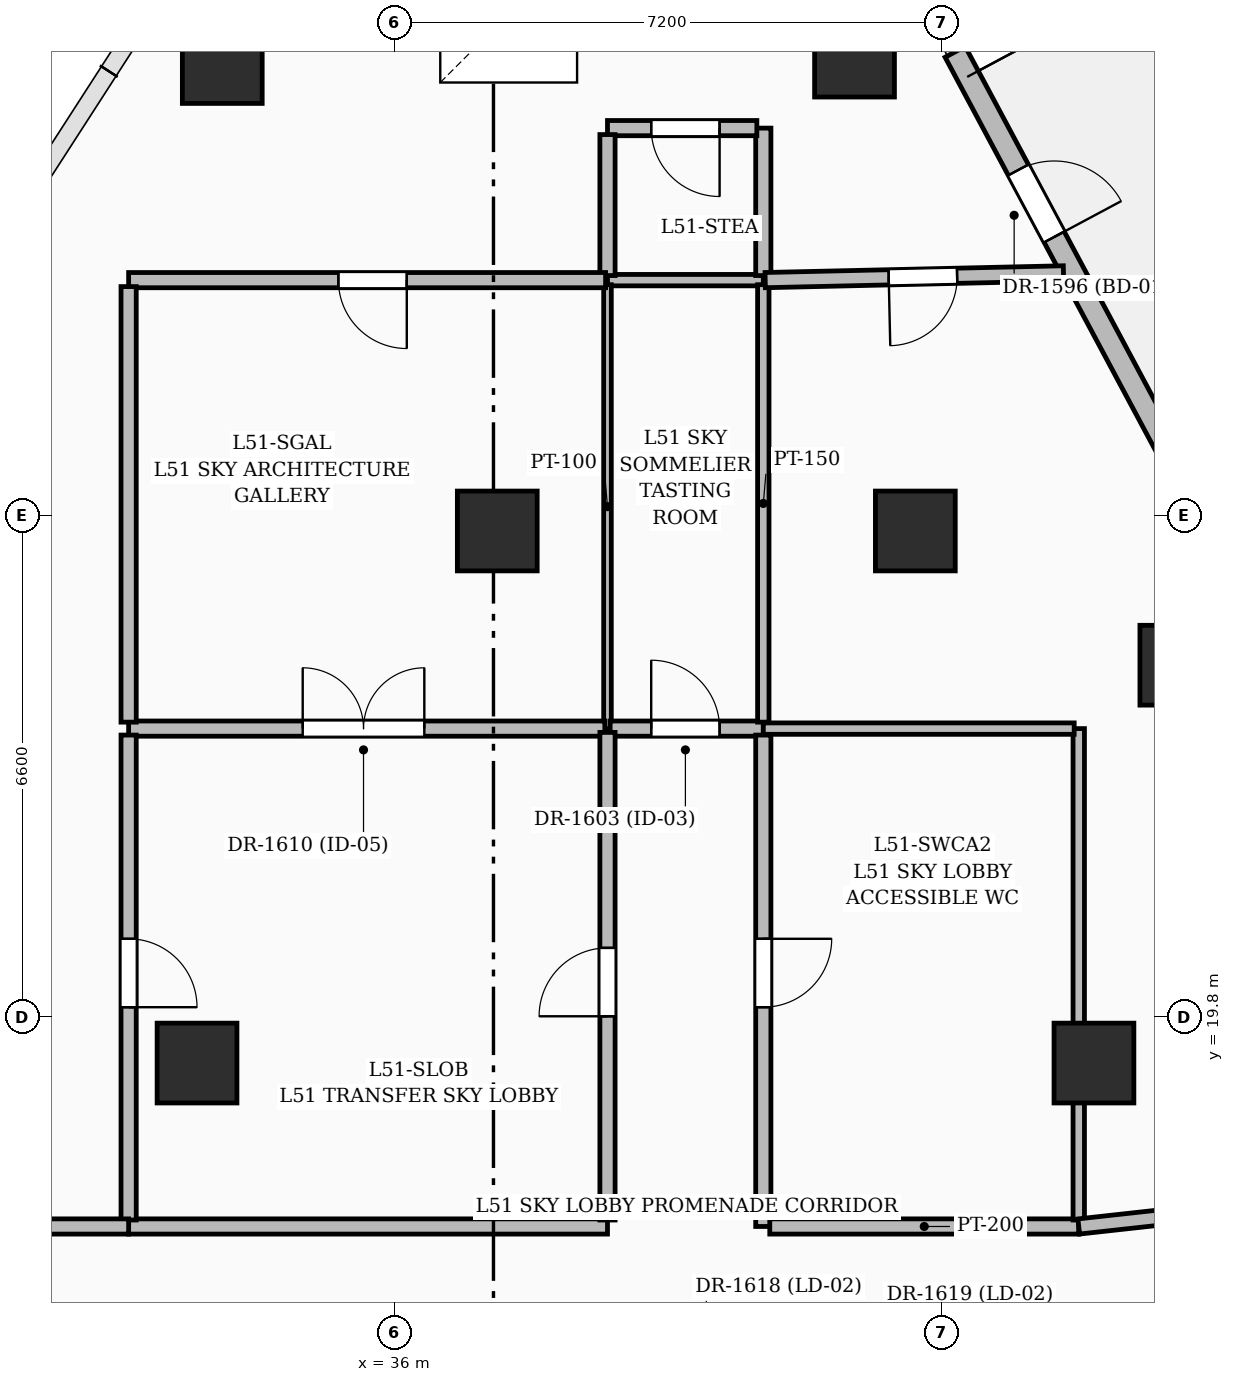
"""IFC4 building model, lengths in metres.
Left out: names, types, materials, properties, quantities, classifications, styles, units other than length and angle.
Written with IfcOpenShell. Run it as: python <this file> out.ifc"""

import sys

from ifc_helpers import new_model, si_unit, direction, frame, frame_2d, origin, origin_2d, place, context, subcontext, project, spatial, rectangle, extrude, element, fill, save


model = new_model("IFC4")
c1 = context("Model", 3, precision=1e-05, world=origin(), true_north=direction((0.0, 1.0)))
c2 = subcontext(c1, "Body", "Model", "MODEL_VIEW")
j1 = project(units=[si_unit("LENGTHUNIT", "METRE"), si_unit("PLANEANGLEUNIT", "RADIAN")], contexts=[c1])
p1 = place(None, origin())
s1 = spatial("IfcSite", under=j1, at=p1, CompositionType="ELEMENT")
p2 = place(p1, origin())
s2 = spatial("IfcBuilding", under=s1, at=p2, CompositionType="ELEMENT")
p3 = place(p2, frame((0.0, 0.0, 196.8)))
s3 = spatial("IfcBuildingStorey", under=s2, at=p3, CompositionType="ELEMENT", Elevation=196.8)
for number, where, z_axis, x_axis in (
    (1, (45.2, 19.2, 0.0), (0.0, 0.0, 1.0), (1.0, 0.0, 0.0)),
    (2, (42.85, 26.2, 0.0), (0.0, 0.0, 1.0), (1.0, 0.0, 0.0)),
    (3, (37.35, 26.2, 0.0), (0.0, 0.0, 1.0), (1.0, 0.0, 0.0)),
    (4, (33.4, 19.2, 0.0), (0.0, 0.0, 1.0), (1.0, 0.0, 0.0)),
    (5, (46.33, 24.434, 0.0), (0.0, 0.0, 1.0), (1.0, 0.0, 0.0)),
    (6, (42.05, 32.434, 0.0), (0.0, 0.0, 1.0), (1.0, 0.0, 0.0)),
    (7, (33.732, 32.35, 0.0), (0.0, 0.0, 1.0), (1.0, 0.0, 0.0)),
):
    element("IfcColumn", number, at=place(p3, frame(where, z_axis=z_axis, x_axis=x_axis)), inside=s3, PredefinedType="COLUMN", context=c2, shape_type="SweptSolid", body=[
        extrude(rectangle(XDim=1.05, YDim=1.05, at=origin_2d()), origin(), (0.0, 0.0, 1.0), 4.8),
    ])
p4 = place(p3, frame((43.374, 32.503, 0.0), z_axis=(0.0, 0.0, 1.0), x_axis=(0.471750001728, -0.881732349338, 0.0)))
e8 = element("IfcWall", 8, at=p4, inside=s3, PredefinedType="SOLIDWALL", context=c2, shape_type="SweptSolid", body=[
    extrude(rectangle(XDim=6.684, YDim=0.3, at=frame_2d((3.342, 0.0))), origin(), (0.0, 0.0, 1.0), 4.5),
])
p5 = place(p4, frame((1.762, 0.0, 0.0)))
e9 = element("IfcOpeningElement", 9, at=p5, cuts=e8, PredefinedType="OPENING", context=c2, shape_type="SweptSolid", body=[
    extrude(rectangle(XDim=1.0, YDim=2.2, at=frame_2d((0.5, 1.1))), frame((0.0, 0.16, 0.0), z_axis=(0.0, -1.0, 0.0), x_axis=(1.0, 0.0, 0.0)), (0.0, 0.0, 1.0), 0.32),
])
p6 = place(p3, frame((38.8, 29.5, 0.0), z_axis=(0.0, 0.0, 1.0), x_axis=(1.0, 0.0, 0.0)))
e10 = element("IfcWall", 10, at=p6, inside=s3, PredefinedType="PARTITIONING", context=c2, shape_type="SweptSolid", body=[
    extrude(rectangle(XDim=2.05, YDim=0.15, at=frame_2d((1.025, 0.0))), origin(), (0.0, 0.0, 1.0), 4.5),
])
p7 = place(p3, frame((40.85, 29.56, 0.0), z_axis=(0.0, 0.0, 1.0), x_axis=(0.0, 1.0, 0.0)))
e11 = element("IfcWall", 11, at=p7, inside=s3, PredefinedType="PARTITIONING", context=c2, shape_type="SweptSolid", body=[
    extrude(rectangle(XDim=1.94, YDim=0.2, at=frame_2d((0.97, 0.0))), origin(), (0.0, 0.0, 1.0), 3.937),
])
p8 = place(p3, frame((40.765, 31.5, 0.0), z_axis=(0.0, 0.0, 1.0), x_axis=(-1.0, 0.0, 0.0)))
e12 = element("IfcWall", 12, at=p8, inside=s3, PredefinedType="PARTITIONING", context=c2, shape_type="SweptSolid", body=[
    extrude(rectangle(XDim=1.965, YDim=0.2, at=frame_2d((0.982, 0.0))), origin(), (0.0, 0.0, 1.0), 4.5),
])
p9 = place(p8, frame((0.49, 0.0, 0.0)))
e13 = element("IfcOpeningElement", 13, at=p9, cuts=e12, PredefinedType="OPENING", context=c2, shape_type="SweptSolid", body=[
    extrude(rectangle(XDim=0.9, YDim=2.1, at=frame_2d((0.45, 1.05))), frame((0.0, 0.11, 0.0), z_axis=(0.0, -1.0, 0.0), x_axis=(1.0, 0.0, 0.0)), (0.0, 0.0, 1.0), 0.22),
])
p10 = place(p3, frame((38.8, 31.415, 0.0), z_axis=(0.0, 0.0, 1.0), x_axis=(0.0, -1.0, 0.0)))
e14 = element("IfcWall", 14, at=p10, inside=s3, PredefinedType="PARTITIONING", context=c2, shape_type="SweptSolid", body=[
    extrude(rectangle(XDim=1.855, YDim=0.2, at=frame_2d((0.927, 0.0))), origin(), (0.0, 0.0, 1.0), 3.937),
])
p11 = place(p3, frame((38.8, 29.44, 0.0), z_axis=(0.0, 0.0, 1.0), x_axis=(0.0, -1.0, 0.0)))
e15 = element("IfcWall", 15, at=p11, inside=s3, PredefinedType="PARTITIONING", context=c2, shape_type="SweptSolid", body=[
    extrude(rectangle(XDim=5.84, YDim=0.1, at=frame_2d((2.92, 0.0))), origin(), (0.0, 0.0, 1.0), 3.586),
])
p12 = place(p3, frame((38.835, 23.6, 0.0), z_axis=(0.0, 0.0, 1.0), x_axis=(1.0, 0.0, 0.0)))
e16 = element("IfcWall", 16, at=p12, inside=s3, PredefinedType="PARTITIONING", context=c2, shape_type="SweptSolid", body=[
    extrude(rectangle(XDim=2.015, YDim=0.2, at=frame_2d((1.008, 0.0))), origin(), (0.0, 0.0, 1.0), 4.5),
])
p13 = place(p12, frame((0.54, 0.0, 0.0)))
e17 = element("IfcOpeningElement", 17, at=p13, cuts=e16, PredefinedType="OPENING", context=c2, shape_type="SweptSolid", body=[
    extrude(rectangle(XDim=0.9, YDim=2.1, at=frame_2d((0.45, 1.05))), frame((0.0, 0.11, 0.0), z_axis=(0.0, -1.0, 0.0), x_axis=(1.0, 0.0, 0.0)), (0.0, 0.0, 1.0), 0.22),
])
p14 = place(p3, frame((40.85, 23.685, 0.0), z_axis=(0.0, 0.0, 1.0), x_axis=(0.0, 1.0, 0.0)))
e18 = element("IfcWall", 18, at=p14, inside=s3, PredefinedType="PARTITIONING", context=c2, shape_type="SweptSolid", body=[
    extrude(rectangle(XDim=5.755, YDim=0.15, at=frame_2d((2.877, 0.0))), origin(), (0.0, 0.0, 1.0), 3.586),
])
p15 = place(p3, frame((40.85, 23.515, 0.0), z_axis=(0.0, 0.0, 1.0), x_axis=(0.0, -1.0, 0.0)))
e19 = element("IfcWall", 19, at=p15, inside=s3, PredefinedType="PARTITIONING", context=c2, shape_type="SweptSolid", body=[
    extrude(rectangle(XDim=6.465, YDim=0.2, at=frame_2d((3.232, 0.0))), origin(), (0.0, 0.0, 1.0), 4.5),
])
p16 = place(p15, frame((2.68, 0.0, 0.0)))
e20 = element("IfcOpeningElement", 20, at=p16, cuts=e19, PredefinedType="OPENING", context=c2, shape_type="SweptSolid", body=[
    extrude(rectangle(XDim=0.9, YDim=2.1, at=frame_2d((0.45, 1.05))), frame((0.0, 0.11, 0.0), z_axis=(0.0, -1.0, 0.0), x_axis=(1.0, 0.0, 0.0)), (0.0, 0.0, 1.0), 0.22),
])
p17 = place(p3, frame((40.935, 17.05, 0.0), z_axis=(0.0, 0.0, 1.0), x_axis=(1.0, 0.0, 0.0)))
e21 = element("IfcWall", 21, at=p17, inside=s3, PredefinedType="PARTITIONING", context=c2, shape_type="SweptSolid", body=[
    extrude(rectangle(XDim=4.065, YDim=0.2, at=frame_2d((2.032, 0.0))), origin(), (0.0, 0.0, 1.0), 4.5),
])
p18 = place(p3, frame((45.0, 17.135, 0.0), z_axis=(0.0, 0.0, 1.0), x_axis=(0.0, 1.0, 0.0)))
e22 = element("IfcWall", 22, at=p18, inside=s3, PredefinedType="PARTITIONING", context=c2, shape_type="SweptSolid", body=[
    extrude(rectangle(XDim=6.465, YDim=0.15, at=frame_2d((3.232, 0.0))), origin(), (0.0, 0.0, 1.0), 2.27),
])
p19 = place(p3, frame((44.94, 23.6, 0.0), z_axis=(0.0, 0.0, 1.0), x_axis=(-1.0, 0.0, 0.0)))
e23 = element("IfcWall", 23, at=p19, inside=s3, PredefinedType="PARTITIONING", context=c2, shape_type="SweptSolid", body=[
    extrude(rectangle(XDim=4.09, YDim=0.15, at=frame_2d((2.045, 0.0))), origin(), (0.0, 0.0, 1.0), 3.586),
])
p20 = place(p3, frame((32.5, 23.6, 0.0), z_axis=(0.0, 0.0, 1.0), x_axis=(1.0, 0.0, 0.0)))
e24 = element("IfcWall", 24, at=p20, inside=s3, PredefinedType="PARTITIONING", context=c2, shape_type="SweptSolid", body=[
    extrude(rectangle(XDim=6.265, YDim=0.2, at=frame_2d((3.132, 0.0))), origin(), (0.0, 0.0, 1.0), 3.586),
])
p21 = place(p20, frame((2.29, 0.0, 0.0)))
e25 = element("IfcOpeningElement", 25, at=p21, cuts=e24, PredefinedType="OPENING", context=c2, shape_type="SweptSolid", body=[
    extrude(rectangle(XDim=1.6, YDim=2.3, at=frame_2d((0.8, 1.15))), frame((0.0, 0.11, 0.0), z_axis=(0.0, -1.0, 0.0), x_axis=(1.0, 0.0, 0.0)), (0.0, 0.0, 1.0), 0.22),
])
p22 = place(p3, frame((38.775, 29.5, 0.0), z_axis=(0.0, 0.0, 1.0), x_axis=(-1.0, 0.0, 0.0)))
e26 = element("IfcWall", 26, at=p22, inside=s3, PredefinedType="PARTITIONING", context=c2, shape_type="SweptSolid", body=[
    extrude(rectangle(XDim=6.275, YDim=0.2, at=frame_2d((3.137, 0.0))), origin(), (0.0, 0.0, 1.0), 2.27),
])
p23 = place(p22, frame((2.615, 0.0, 0.0)))
e27 = element("IfcOpeningElement", 27, at=p23, cuts=e26, PredefinedType="OPENING", context=c2, shape_type="SweptSolid", body=[
    extrude(rectangle(XDim=0.9, YDim=2.1, at=frame_2d((0.45, 1.05))), frame((0.0, 0.11, 0.0), z_axis=(0.0, -1.0, 0.0), x_axis=(1.0, 0.0, 0.0)), (0.0, 0.0, 1.0), 0.22),
])
p24 = place(p3, frame((32.5, 29.415, 0.0), z_axis=(0.0, 0.0, 1.0), x_axis=(0.0, -1.0, 0.0)))
e28 = element("IfcWall", 28, at=p24, inside=s3, PredefinedType="PARTITIONING", context=c2, shape_type="SweptSolid", body=[
    extrude(rectangle(XDim=5.73, YDim=0.2, at=frame_2d((2.865, 0.0))), origin(), (0.0, 0.0, 1.0), 3.937),
])
p25 = place(p3, frame((32.5, 17.05, 0.0), z_axis=(0.0, 0.0, 1.0), x_axis=(1.0, 0.0, 0.0)))
e29 = element("IfcWall", 29, at=p25, inside=s3, PredefinedType="PARTITIONING", context=c2, shape_type="SweptSolid", body=[
    extrude(rectangle(XDim=6.3, YDim=0.2, at=frame_2d((3.15, 0.0))), origin(), (0.0, 0.0, 1.0), 3.586),
])
p26 = place(p3, frame((38.8, 17.135, 0.0), z_axis=(0.0, 0.0, 1.0), x_axis=(0.0, 1.0, 0.0)))
e30 = element("IfcWall", 30, at=p26, inside=s3, PredefinedType="PARTITIONING", context=c2, shape_type="SweptSolid", body=[
    extrude(rectangle(XDim=6.415, YDim=0.2, at=frame_2d((3.208, 0.0))), origin(), (0.0, 0.0, 1.0), 4.5),
])
p27 = place(p26, frame((2.68, 0.0, 0.0)))
e31 = element("IfcOpeningElement", 31, at=p27, cuts=e30, PredefinedType="OPENING", context=c2, shape_type="SweptSolid", body=[
    extrude(rectangle(XDim=0.9, YDim=2.1, at=frame_2d((0.45, 1.05))), frame((0.0, 0.11, 0.0), z_axis=(0.0, -1.0, 0.0), x_axis=(1.0, 0.0, 0.0)), (0.0, 0.0, 1.0), 0.22),
])
p28 = place(p3, frame((32.5, 23.515, 0.0), z_axis=(0.0, 0.0, 1.0), x_axis=(0.0, -1.0, 0.0)))
e32 = element("IfcWall", 32, at=p28, inside=s3, PredefinedType="PARTITIONING", context=c2, shape_type="SweptSolid", body=[
    extrude(rectangle(XDim=6.38, YDim=0.2, at=frame_2d((3.19, 0.0))), origin(), (0.0, 0.0, 1.0), 2.27),
])
p29 = place(p28, frame((2.68, 0.0, 0.0)))
e33 = element("IfcOpeningElement", 33, at=p29, cuts=e32, PredefinedType="OPENING", context=c2, shape_type="SweptSolid", body=[
    extrude(rectangle(XDim=0.9, YDim=2.1, at=frame_2d((0.45, 1.05))), frame((0.0, 0.11, 0.0), z_axis=(0.0, -1.0, 0.0), x_axis=(1.0, 0.0, 0.0)), (0.0, 0.0, 1.0), 0.22),
])
p30 = place(p3, frame((48.947, 17.486, 0.0), z_axis=(0.0, 0.0, 1.0), x_axis=(-0.993953264298, -0.109803954354, 0.0)))
e34 = element("IfcWall", 34, at=p30, inside=s3, PredefinedType="PARTITIONING", context=c2, shape_type="SweptSolid", body=[
    extrude(rectangle(XDim=3.971, YDim=0.2, at=frame_2d((1.985, 0.0))), origin(), (0.0, 0.0, 1.0), 2.27),
])
p31 = place(p30, frame((1.524, 0.0, 0.0)))
e35 = element("IfcOpeningElement", 35, at=p31, cuts=e34, PredefinedType="OPENING", context=c2, shape_type="SweptSolid", body=[
    extrude(rectangle(XDim=0.9, YDim=2.1, at=frame_2d((0.45, 1.05))), frame((0.0, 0.11, 0.0), z_axis=(0.0, -1.0, 0.0), x_axis=(1.0, 0.0, 0.0)), (0.0, 0.0, 1.0), 0.22),
])
p32 = place(p3, frame((32.5, 17.05, 0.0), z_axis=(0.0, 0.0, 1.0), x_axis=(-1.0, 0.0, 0.0)))
e36 = element("IfcWall", 36, at=p32, inside=s3, PredefinedType="PARTITIONING", context=c2, shape_type="SweptSolid", body=[
    extrude(rectangle(XDim=5.7, YDim=0.2, at=frame_2d((2.85, 0.0))), origin(), (0.0, 0.0, 1.0), 3.937),
])
p33 = place(p32, frame((2.4, 0.0, 0.0)))
e37 = element("IfcOpeningElement", 37, at=p33, cuts=e36, PredefinedType="OPENING", context=c2, shape_type="SweptSolid", body=[
    extrude(rectangle(XDim=0.9, YDim=2.1, at=frame_2d((0.45, 1.05))), frame((0.0, 0.11, 0.0), z_axis=(0.0, -1.0, 0.0), x_axis=(1.0, 0.0, 0.0)), (0.0, 0.0, 1.0), 0.22),
])
p34 = place(p3, frame((44.799, 29.589, 0.0), z_axis=(0.0, 0.0, 1.0), x_axis=(-0.999745068637, -0.022578700922, 0.0)))
e38 = element("IfcWall", 38, at=p34, inside=s3, PredefinedType="PARTITIONING", context=c2, shape_type="SweptSolid", body=[
    extrude(rectangle(XDim=3.925, YDim=0.2, at=frame_2d((1.962, 0.0))), origin(), (0.0, 0.0, 1.0), 2.27),
])
p35 = place(p34, frame((1.4, 0.0, 0.0)))
e39 = element("IfcOpeningElement", 39, at=p35, cuts=e38, PredefinedType="OPENING", context=c2, shape_type="SweptSolid", body=[
    extrude(rectangle(XDim=0.9, YDim=2.1, at=frame_2d((0.45, 1.05))), frame((0.0, 0.11, 0.0), z_axis=(0.0, -1.0, 0.0), x_axis=(1.0, 0.0, 0.0)), (0.0, 0.0, 1.0), 0.22),
])
p36 = place(p5, origin())
e40 = element("IfcDoor", 40, at=p36, inside=s3, OperationType="SINGLE_SWING_RIGHT", PredefinedType="DOOR", context=c2, shape_type="SweptSolid", body=[
    extrude(rectangle(XDim=1.0, YDim=2.2, at=frame_2d((0.5, 1.1))), frame((0.0, 0.025, 0.0), z_axis=(0.0, -1.0, 0.0), x_axis=(1.0, 0.0, 0.0)), (0.0, 0.0, 1.0), 0.05),
])
fill(e9, e40)
p37 = place(p3, frame((0.0, 0.0, -0.3)))
p38 = place(p37, frame((37.5, 33.0, 0.0)))
p39 = place(p38, frame((0.0, 0.0, 0.25)))
e41 = element("IfcWindow", 41, at=p39, inside=s3, PartitioningType="SINGLE_PANEL", PredefinedType="SKYLIGHT", context=c2, shape_type="SweptSolid", body=[
    extrude(rectangle(XDim=1.8, YDim=1.8, at=origin_2d()), origin(), (0.0, 0.0, 1.0), 0.05),
])
p40 = place(p13, origin())
e42 = element("IfcDoor", 42, at=p40, inside=s3, OperationType="SINGLE_SWING_LEFT", PredefinedType="DOOR", context=c2, shape_type="SweptSolid", body=[
    extrude(rectangle(XDim=0.9, YDim=2.1, at=frame_2d((0.45, 1.05))), frame((0.0, 0.025, 0.0), z_axis=(0.0, -1.0, 0.0), x_axis=(1.0, 0.0, 0.0)), (0.0, 0.0, 1.0), 0.05),
])
fill(e17, e42)
p41 = place(p35, origin())
e43 = element("IfcDoor", 43, at=p41, inside=s3, OperationType="SINGLE_SWING_RIGHT", PredefinedType="DOOR", context=c2, shape_type="SweptSolid", body=[
    extrude(rectangle(XDim=0.9, YDim=2.1, at=frame_2d((0.45, 1.05))), frame((0.0, 0.025, 0.0), z_axis=(0.0, -1.0, 0.0), x_axis=(1.0, 0.0, 0.0)), (0.0, 0.0, 1.0), 0.05),
])
fill(e39, e43)
p42 = place(p27, origin())
e44 = element("IfcDoor", 44, at=p42, inside=s3, OperationType="SINGLE_SWING_LEFT", PredefinedType="DOOR", context=c2, shape_type="SweptSolid", body=[
    extrude(rectangle(XDim=0.9, YDim=2.1, at=frame_2d((0.45, 1.05))), frame((0.0, 0.025, 0.0), z_axis=(0.0, -1.0, 0.0), x_axis=(1.0, 0.0, 0.0)), (0.0, 0.0, 1.0), 0.05),
])
fill(e31, e44)
p43 = place(p16, origin())
e45 = element("IfcDoor", 45, at=p43, inside=s3, OperationType="SINGLE_SWING_LEFT", PredefinedType="DOOR", context=c2, shape_type="SweptSolid", body=[
    extrude(rectangle(XDim=0.9, YDim=2.1, at=frame_2d((0.45, 1.05))), frame((0.0, 0.025, 0.0), z_axis=(0.0, -1.0, 0.0), x_axis=(1.0, 0.0, 0.0)), (0.0, 0.0, 1.0), 0.05),
])
fill(e20, e45)
p44 = place(p21, origin())
e46 = element("IfcDoor", 46, at=p44, inside=s3, OperationType="DOUBLE_DOOR_SINGLE_SWING", PredefinedType="DOOR", context=c2, shape_type="SweptSolid", body=[
    extrude(rectangle(XDim=1.6, YDim=2.3, at=frame_2d((0.8, 1.15))), frame((0.0, 0.025, 0.0), z_axis=(0.0, -1.0, 0.0), x_axis=(1.0, 0.0, 0.0)), (0.0, 0.0, 1.0), 0.05),
])
fill(e25, e46)
p45 = place(p23, origin())
e47 = element("IfcDoor", 47, at=p45, inside=s3, OperationType="SINGLE_SWING_LEFT", PredefinedType="DOOR", context=c2, shape_type="SweptSolid", body=[
    extrude(rectangle(XDim=0.9, YDim=2.1, at=frame_2d((0.45, 1.05))), frame((0.0, 0.025, 0.0), z_axis=(0.0, -1.0, 0.0), x_axis=(1.0, 0.0, 0.0)), (0.0, 0.0, 1.0), 0.05),
])
fill(e27, e47)
p46 = place(p29, origin())
e48 = element("IfcDoor", 48, at=p46, inside=s3, OperationType="SINGLE_SWING_RIGHT", PredefinedType="DOOR", context=c2, shape_type="SweptSolid", body=[
    extrude(rectangle(XDim=0.9, YDim=2.1, at=frame_2d((0.45, 1.05))), frame((0.0, 0.025, 0.0), z_axis=(0.0, -1.0, 0.0), x_axis=(1.0, 0.0, 0.0)), (0.0, 0.0, 1.0), 0.05),
])
fill(e33, e48)
p47 = place(p9, origin())
e49 = element("IfcDoor", 49, at=p47, inside=s3, OperationType="SINGLE_SWING_LEFT", PredefinedType="DOOR", context=c2, shape_type="SweptSolid", body=[
    extrude(rectangle(XDim=0.9, YDim=2.1, at=frame_2d((0.45, 1.05))), frame((0.0, 0.025, 0.0), z_axis=(0.0, -1.0, 0.0), x_axis=(1.0, 0.0, 0.0)), (0.0, 0.0, 1.0), 0.05),
])
fill(e13, e49)
save(model, sys.argv[1])
